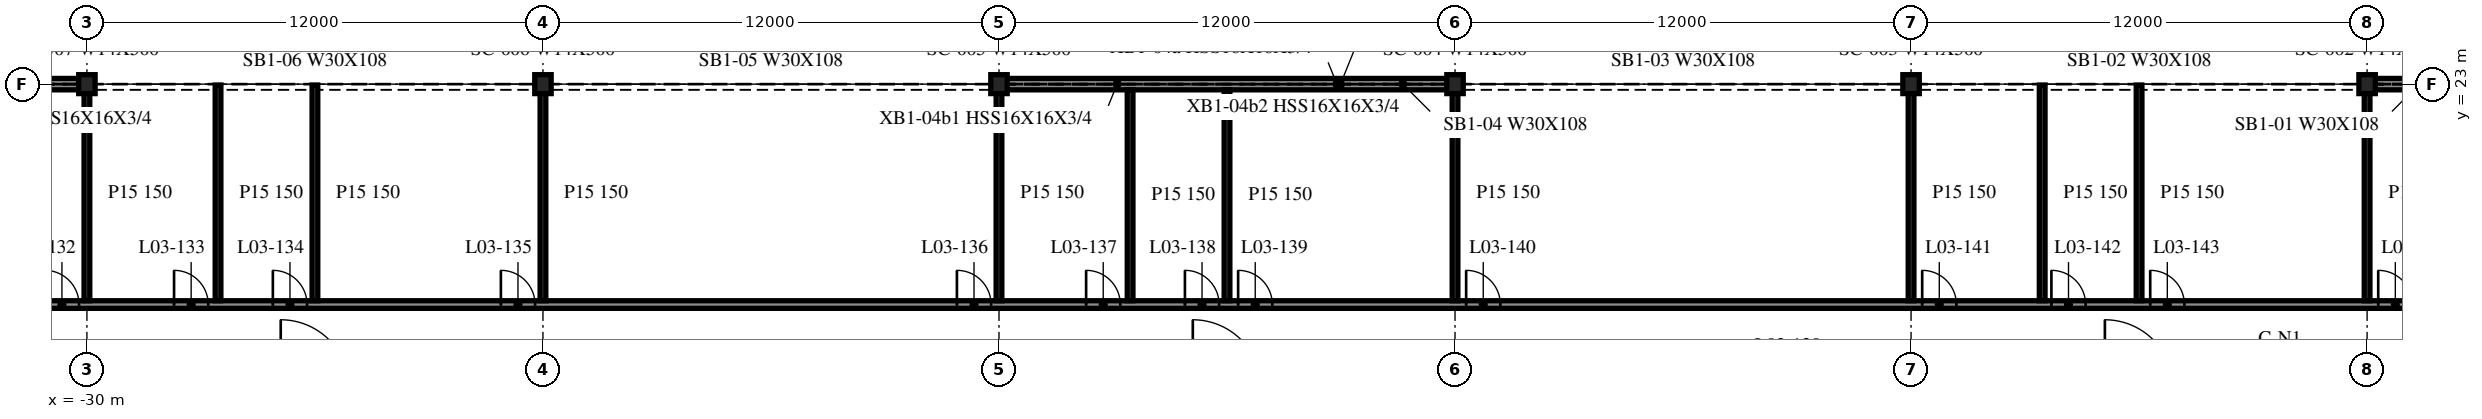
"""IFC4 building model, lengths in metres.
Left out: names, types, materials, properties, quantities, classifications, styles, units other than length and angle.
Written with IfcOpenShell. Run it as: python <this file> out.ifc"""

import sys

from ifc_helpers import new_model, si_unit, direction, frame, frame_2d, origin, origin_2d, place, context, subcontext, project, spatial, rectangle, i_section, extrude, element, fill, save


model = new_model("IFC4")
c1 = context("Model", 3, precision=1e-05, world=origin(), true_north=direction((0.0, 1.0)))
c2 = subcontext(c1, "Body", "Model", "MODEL_VIEW")
j1 = project(units=[si_unit("LENGTHUNIT", "METRE"), si_unit("PLANEANGLEUNIT", "RADIAN")], contexts=[c1])
p1 = place(None, origin())
s1 = spatial("IfcSite", under=j1, at=p1, CompositionType="ELEMENT")
p2 = place(p1, origin())
s2 = spatial("IfcBuilding", under=s1, at=p2, CompositionType="ELEMENT")
p3 = place(p2, frame((0.0, 0.0, 15.8)))
s3 = spatial("IfcBuildingStorey", under=s2, at=p3, CompositionType="ELEMENT", Elevation=15.8)
for number, where, z_axis, x_axis in (
    (1, (30.0, 23.0, -0.34), (0.0, 0.0, 1.0), (1.0, 0.0, 0.0)),
    (2, (18.0, 23.0, -0.34), (0.0, 0.0, 1.0), (1.0, 0.0, 0.0)),
    (3, (6.0, 23.0, -0.34), (0.0, 0.0, 1.0), (1.0, 0.0, 0.0)),
    (4, (-6.0, 23.0, -0.34), (0.0, 0.0, 1.0), (1.0, 0.0, 0.0)),
    (5, (-18.0, 23.0, -0.34), (0.0, 0.0, 1.0), (1.0, 0.0, 0.0)),
    (6, (-30.0, 23.0, -0.34), (0.0, 0.0, 1.0), (1.0, 0.0, 0.0)),
):
    element("IfcColumn", number, at=place(p3, frame(where, z_axis=z_axis, x_axis=x_axis)), inside=s3, PredefinedType="COLUMN", context=c2, shape_type="SweptSolid", body=[
        extrude(i_section(OverallWidth=0.432, OverallDepth=0.498, WebThickness=0.056, FlangeThickness=0.089, at=origin_2d()), origin(), (0.0, 0.0, 1.0), 4.3),
    ])
for number, where, z_axis, x_axis in (
    (7, (41.972, 23.0, 0.0), (0.0, 0.0, 1.0), (-1.0, 0.0, 0.0)),
    (8, (5.972, 23.0, 0.0), (0.0, 0.0, 1.0), (-1.0, 0.0, 0.0)),
    (9, (-30.028, 23.0, 0.0), (0.0, 0.0, 1.0), (-1.0, 0.0, 0.0)),
):
    element("IfcWall", number, at=place(p3, frame(where, z_axis=z_axis, x_axis=x_axis)), inside=s3, PredefinedType="NOTDEFINED", context=c2, shape_type="SweptSolid", body=[
        extrude(rectangle(XDim=11.944, YDim=0.3, at=frame_2d((5.972, 0.0))), origin(), (0.0, 0.0, 1.0), 3.203),
    ])
p4 = place(p3, frame((-47.807, 17.2, 0.0), z_axis=(0.0, 0.0, 1.0), x_axis=(1.0, 0.0, 0.0)))
e10 = element("IfcWall", 10, at=p4, inside=s3, PredefinedType="PARTITIONING", context=c2, shape_type="SweptSolid", body=[
    extrude(rectangle(XDim=95.615, YDim=0.2, at=frame_2d((47.807, 0.0))), origin(), (0.0, 0.0, 1.0), 3.96),
])
p5 = place(p4, frame((4.7, 0.0, 0.0)))
e11 = element("IfcOpeningElement", 11, at=p5, cuts=e10, PredefinedType="OPENING", context=c2, shape_type="SweptSolid", body=[
    extrude(rectangle(XDim=0.9, YDim=2.1, at=frame_2d((0.45, 1.05))), frame((0.0, 0.11, 0.0), z_axis=(0.0, -1.0, 0.0), x_axis=(1.0, 0.0, 0.0)), (0.0, 0.0, 1.0), 0.22),
])
p6 = place(p4, frame((16.7, 0.0, 0.0)))
e12 = element("IfcOpeningElement", 12, at=p6, cuts=e10, PredefinedType="OPENING", context=c2, shape_type="SweptSolid", body=[
    extrude(rectangle(XDim=0.9, YDim=2.1, at=frame_2d((0.45, 1.05))), frame((0.0, 0.11, 0.0), z_axis=(0.0, -1.0, 0.0), x_axis=(1.0, 0.0, 0.0)), (0.0, 0.0, 1.0), 0.22),
])
p7 = place(p4, frame((20.1, 0.0, 0.0)))
e13 = element("IfcOpeningElement", 13, at=p7, cuts=e10, PredefinedType="OPENING", context=c2, shape_type="SweptSolid", body=[
    extrude(rectangle(XDim=0.9, YDim=2.1, at=frame_2d((0.45, 1.05))), frame((0.0, 0.11, 0.0), z_axis=(0.0, -1.0, 0.0), x_axis=(1.0, 0.0, 0.0)), (0.0, 0.0, 1.0), 0.22),
])
p8 = place(p4, frame((22.7, 0.0, 0.0)))
e14 = element("IfcOpeningElement", 14, at=p8, cuts=e10, PredefinedType="OPENING", context=c2, shape_type="SweptSolid", body=[
    extrude(rectangle(XDim=0.9, YDim=2.1, at=frame_2d((0.45, 1.05))), frame((0.0, 0.11, 0.0), z_axis=(0.0, -1.0, 0.0), x_axis=(1.0, 0.0, 0.0)), (0.0, 0.0, 1.0), 0.22),
])
p9 = place(p4, frame((28.7, 0.0, 0.0)))
e15 = element("IfcOpeningElement", 15, at=p9, cuts=e10, PredefinedType="OPENING", context=c2, shape_type="SweptSolid", body=[
    extrude(rectangle(XDim=0.9, YDim=2.1, at=frame_2d((0.45, 1.05))), frame((0.0, 0.11, 0.0), z_axis=(0.0, -1.0, 0.0), x_axis=(1.0, 0.0, 0.0)), (0.0, 0.0, 1.0), 0.22),
])
p10 = place(p4, frame((40.7, 0.0, 0.0)))
e16 = element("IfcOpeningElement", 16, at=p10, cuts=e10, PredefinedType="OPENING", context=c2, shape_type="SweptSolid", body=[
    extrude(rectangle(XDim=0.9, YDim=2.1, at=frame_2d((0.45, 1.05))), frame((0.0, 0.11, 0.0), z_axis=(0.0, -1.0, 0.0), x_axis=(1.0, 0.0, 0.0)), (0.0, 0.0, 1.0), 0.22),
])
p11 = place(p4, frame((44.1, 0.0, 0.0)))
e17 = element("IfcOpeningElement", 17, at=p11, cuts=e10, PredefinedType="OPENING", context=c2, shape_type="SweptSolid", body=[
    extrude(rectangle(XDim=0.9, YDim=2.1, at=frame_2d((0.45, 1.05))), frame((0.0, 0.11, 0.0), z_axis=(0.0, -1.0, 0.0), x_axis=(1.0, 0.0, 0.0)), (0.0, 0.0, 1.0), 0.22),
])
p12 = place(p4, frame((46.7, 0.0, 0.0)))
e18 = element("IfcOpeningElement", 18, at=p12, cuts=e10, PredefinedType="OPENING", context=c2, shape_type="SweptSolid", body=[
    extrude(rectangle(XDim=0.9, YDim=2.1, at=frame_2d((0.45, 1.05))), frame((0.0, 0.11, 0.0), z_axis=(0.0, -1.0, 0.0), x_axis=(1.0, 0.0, 0.0)), (0.0, 0.0, 1.0), 0.22),
])
p13 = place(p4, frame((48.1, 0.0, 0.0)))
e19 = element("IfcOpeningElement", 19, at=p13, cuts=e10, PredefinedType="OPENING", context=c2, shape_type="SweptSolid", body=[
    extrude(rectangle(XDim=0.9, YDim=2.1, at=frame_2d((0.45, 1.05))), frame((0.0, 0.11, 0.0), z_axis=(0.0, -1.0, 0.0), x_axis=(1.0, 0.0, 0.0)), (0.0, 0.0, 1.0), 0.22),
])
p14 = place(p4, frame((54.1, 0.0, 0.0)))
e20 = element("IfcOpeningElement", 20, at=p14, cuts=e10, PredefinedType="OPENING", context=c2, shape_type="SweptSolid", body=[
    extrude(rectangle(XDim=0.9, YDim=2.1, at=frame_2d((0.45, 1.05))), frame((0.0, 0.11, 0.0), z_axis=(0.0, -1.0, 0.0), x_axis=(1.0, 0.0, 0.0)), (0.0, 0.0, 1.0), 0.22),
])
p15 = place(p4, frame((66.1, 0.0, 0.0)))
e21 = element("IfcOpeningElement", 21, at=p15, cuts=e10, PredefinedType="OPENING", context=c2, shape_type="SweptSolid", body=[
    extrude(rectangle(XDim=0.9, YDim=2.1, at=frame_2d((0.45, 1.05))), frame((0.0, 0.11, 0.0), z_axis=(0.0, -1.0, 0.0), x_axis=(1.0, 0.0, 0.0)), (0.0, 0.0, 1.0), 0.22),
])
p16 = place(p4, frame((69.5, 0.0, 0.0)))
e22 = element("IfcOpeningElement", 22, at=p16, cuts=e10, PredefinedType="OPENING", context=c2, shape_type="SweptSolid", body=[
    extrude(rectangle(XDim=0.9, YDim=2.1, at=frame_2d((0.45, 1.05))), frame((0.0, 0.11, 0.0), z_axis=(0.0, -1.0, 0.0), x_axis=(1.0, 0.0, 0.0)), (0.0, 0.0, 1.0), 0.22),
])
p17 = place(p4, frame((72.1, 0.0, 0.0)))
e23 = element("IfcOpeningElement", 23, at=p17, cuts=e10, PredefinedType="OPENING", context=c2, shape_type="SweptSolid", body=[
    extrude(rectangle(XDim=0.9, YDim=2.1, at=frame_2d((0.45, 1.05))), frame((0.0, 0.11, 0.0), z_axis=(0.0, -1.0, 0.0), x_axis=(1.0, 0.0, 0.0)), (0.0, 0.0, 1.0), 0.22),
])
p18 = place(p4, frame((78.1, 0.0, 0.0)))
e24 = element("IfcOpeningElement", 24, at=p18, cuts=e10, PredefinedType="OPENING", context=c2, shape_type="SweptSolid", body=[
    extrude(rectangle(XDim=0.9, YDim=2.1, at=frame_2d((0.45, 1.05))), frame((0.0, 0.11, 0.0), z_axis=(0.0, -1.0, 0.0), x_axis=(1.0, 0.0, 0.0)), (0.0, 0.0, 1.0), 0.22),
])
p19 = place(p4, frame((90.1, 0.0, 0.0)))
e25 = element("IfcOpeningElement", 25, at=p19, cuts=e10, PredefinedType="OPENING", context=c2, shape_type="SweptSolid", body=[
    extrude(rectangle(XDim=0.9, YDim=2.1, at=frame_2d((0.45, 1.05))), frame((0.0, 0.11, 0.0), z_axis=(0.0, -1.0, 0.0), x_axis=(1.0, 0.0, 0.0)), (0.0, 0.0, 1.0), 0.22),
])
for number, where, z_axis, x_axis in (
    (26, (-30.0, 17.3, 0.0), (0.0, 0.0, 1.0), (0.0, 1.0, 0.0)),
    (27, (-26.55, 17.3, 0.0), (0.0, 0.0, 1.0), (0.0, 1.0, 0.0)),
    (28, (-24.0, 17.3, 0.0), (0.0, 0.0, 1.0), (0.0, 1.0, 0.0)),
    (29, (-18.0, 17.3, 0.0), (0.0, 0.0, 1.0), (0.0, 1.0, 0.0)),
    (30, (-6.0, 17.3, 0.0), (0.0, 0.0, 1.0), (0.0, 1.0, 0.0)),
):
    element("IfcWall", number, at=place(p3, frame(where, z_axis=z_axis, x_axis=x_axis)), inside=s3, PredefinedType="PARTITIONING", context=c2, shape_type="SweptSolid", body=[
        extrude(rectangle(XDim=5.675, YDim=0.15, at=frame_2d((2.837, 0.0))), origin(), (0.0, 0.0, 1.0), 3.96),
    ])
for number, where, z_axis, x_axis in (
    (31, (-2.55, 17.3, 0.0), (0.0, 0.0, 1.0), (0.0, 1.0, 0.0)),
    (32, (0.0, 17.3, 0.0), (0.0, 0.0, 1.0), (0.0, 1.0, 0.0)),
):
    element("IfcWall", number, at=place(p3, frame(where, z_axis=z_axis, x_axis=x_axis)), inside=s3, PredefinedType="PARTITIONING", context=c2, shape_type="SweptSolid", body=[
        extrude(rectangle(XDim=5.55, YDim=0.15, at=frame_2d((2.775, 0.0))), origin(), (0.0, 0.0, 1.0), 3.96),
    ])
for number, where, z_axis, x_axis in (
    (33, (6.0, 17.3, 0.0), (0.0, 0.0, 1.0), (0.0, 1.0, 0.0)),
    (34, (18.0, 17.3, 0.0), (0.0, 0.0, 1.0), (0.0, 1.0, 0.0)),
    (35, (21.45, 17.3, 0.0), (0.0, 0.0, 1.0), (0.0, 1.0, 0.0)),
    (36, (24.0, 17.3, 0.0), (0.0, 0.0, 1.0), (0.0, 1.0, 0.0)),
    (37, (30.0, 17.3, 0.0), (0.0, 0.0, 1.0), (0.0, 1.0, 0.0)),
):
    element("IfcWall", number, at=place(p3, frame(where, z_axis=z_axis, x_axis=x_axis)), inside=s3, PredefinedType="PARTITIONING", context=c2, shape_type="SweptSolid", body=[
        extrude(rectangle(XDim=5.675, YDim=0.15, at=frame_2d((2.837, 0.0))), origin(), (0.0, 0.0, 1.0), 3.96),
    ])
p20 = place(p6, origin())
e38 = element("IfcDoor", 38, at=p20, inside=s3, OperationType="SINGLE_SWING_LEFT", PredefinedType="DOOR", context=c2, shape_type="SweptSolid", body=[
    extrude(rectangle(XDim=0.9, YDim=2.1, at=frame_2d((0.45, 1.05))), frame((0.0, 0.025, 0.0), z_axis=(0.0, -1.0, 0.0), x_axis=(1.0, 0.0, 0.0)), (0.0, 0.0, 1.0), 0.05),
])
fill(e12, e38)
p21 = place(p7, origin())
e39 = element("IfcDoor", 39, at=p21, inside=s3, OperationType="SINGLE_SWING_LEFT", PredefinedType="DOOR", context=c2, shape_type="SweptSolid", body=[
    extrude(rectangle(XDim=0.9, YDim=2.1, at=frame_2d((0.45, 1.05))), frame((0.0, 0.025, 0.0), z_axis=(0.0, -1.0, 0.0), x_axis=(1.0, 0.0, 0.0)), (0.0, 0.0, 1.0), 0.05),
])
fill(e13, e39)
p22 = place(p8, origin())
e40 = element("IfcDoor", 40, at=p22, inside=s3, OperationType="SINGLE_SWING_LEFT", PredefinedType="DOOR", context=c2, shape_type="SweptSolid", body=[
    extrude(rectangle(XDim=0.9, YDim=2.1, at=frame_2d((0.45, 1.05))), frame((0.0, 0.025, 0.0), z_axis=(0.0, -1.0, 0.0), x_axis=(1.0, 0.0, 0.0)), (0.0, 0.0, 1.0), 0.05),
])
fill(e14, e40)
p23 = place(p9, origin())
e41 = element("IfcDoor", 41, at=p23, inside=s3, OperationType="SINGLE_SWING_LEFT", PredefinedType="DOOR", context=c2, shape_type="SweptSolid", body=[
    extrude(rectangle(XDim=0.9, YDim=2.1, at=frame_2d((0.45, 1.05))), frame((0.0, 0.025, 0.0), z_axis=(0.0, -1.0, 0.0), x_axis=(1.0, 0.0, 0.0)), (0.0, 0.0, 1.0), 0.05),
])
fill(e15, e41)
p24 = place(p10, origin())
e42 = element("IfcDoor", 42, at=p24, inside=s3, OperationType="SINGLE_SWING_LEFT", PredefinedType="DOOR", context=c2, shape_type="SweptSolid", body=[
    extrude(rectangle(XDim=0.9, YDim=2.1, at=frame_2d((0.45, 1.05))), frame((0.0, 0.025, 0.0), z_axis=(0.0, -1.0, 0.0), x_axis=(1.0, 0.0, 0.0)), (0.0, 0.0, 1.0), 0.05),
])
fill(e16, e42)
p25 = place(p11, origin())
e43 = element("IfcDoor", 43, at=p25, inside=s3, OperationType="SINGLE_SWING_LEFT", PredefinedType="DOOR", context=c2, shape_type="SweptSolid", body=[
    extrude(rectangle(XDim=0.9, YDim=2.1, at=frame_2d((0.45, 1.05))), frame((0.0, 0.025, 0.0), z_axis=(0.0, -1.0, 0.0), x_axis=(1.0, 0.0, 0.0)), (0.0, 0.0, 1.0), 0.05),
])
fill(e17, e43)
p26 = place(p12, origin())
e44 = element("IfcDoor", 44, at=p26, inside=s3, OperationType="SINGLE_SWING_LEFT", PredefinedType="DOOR", context=c2, shape_type="SweptSolid", body=[
    extrude(rectangle(XDim=0.9, YDim=2.1, at=frame_2d((0.45, 1.05))), frame((0.0, 0.025, 0.0), z_axis=(0.0, -1.0, 0.0), x_axis=(1.0, 0.0, 0.0)), (0.0, 0.0, 1.0), 0.05),
])
fill(e18, e44)
p27 = place(p13, origin())
e45 = element("IfcDoor", 45, at=p27, inside=s3, OperationType="SINGLE_SWING_RIGHT", PredefinedType="DOOR", context=c2, shape_type="SweptSolid", body=[
    extrude(rectangle(XDim=0.9, YDim=2.1, at=frame_2d((0.45, 1.05))), frame((0.0, 0.025, 0.0), z_axis=(0.0, -1.0, 0.0), x_axis=(1.0, 0.0, 0.0)), (0.0, 0.0, 1.0), 0.05),
])
fill(e19, e45)
p28 = place(p14, origin())
e46 = element("IfcDoor", 46, at=p28, inside=s3, OperationType="SINGLE_SWING_RIGHT", PredefinedType="DOOR", context=c2, shape_type="SweptSolid", body=[
    extrude(rectangle(XDim=0.9, YDim=2.1, at=frame_2d((0.45, 1.05))), frame((0.0, 0.025, 0.0), z_axis=(0.0, -1.0, 0.0), x_axis=(1.0, 0.0, 0.0)), (0.0, 0.0, 1.0), 0.05),
])
fill(e20, e46)
p29 = place(p15, origin())
e47 = element("IfcDoor", 47, at=p29, inside=s3, OperationType="SINGLE_SWING_RIGHT", PredefinedType="DOOR", context=c2, shape_type="SweptSolid", body=[
    extrude(rectangle(XDim=0.9, YDim=2.1, at=frame_2d((0.45, 1.05))), frame((0.0, 0.025, 0.0), z_axis=(0.0, -1.0, 0.0), x_axis=(1.0, 0.0, 0.0)), (0.0, 0.0, 1.0), 0.05),
])
fill(e21, e47)
p30 = place(p16, origin())
e48 = element("IfcDoor", 48, at=p30, inside=s3, OperationType="SINGLE_SWING_RIGHT", PredefinedType="DOOR", context=c2, shape_type="SweptSolid", body=[
    extrude(rectangle(XDim=0.9, YDim=2.1, at=frame_2d((0.45, 1.05))), frame((0.0, 0.025, 0.0), z_axis=(0.0, -1.0, 0.0), x_axis=(1.0, 0.0, 0.0)), (0.0, 0.0, 1.0), 0.05),
])
fill(e22, e48)
p31 = place(p17, origin())
e49 = element("IfcDoor", 49, at=p31, inside=s3, OperationType="SINGLE_SWING_RIGHT", PredefinedType="DOOR", context=c2, shape_type="SweptSolid", body=[
    extrude(rectangle(XDim=0.9, YDim=2.1, at=frame_2d((0.45, 1.05))), frame((0.0, 0.025, 0.0), z_axis=(0.0, -1.0, 0.0), x_axis=(1.0, 0.0, 0.0)), (0.0, 0.0, 1.0), 0.05),
])
fill(e23, e49)
p32 = place(p18, origin())
e50 = element("IfcDoor", 50, at=p32, inside=s3, OperationType="SINGLE_SWING_RIGHT", PredefinedType="DOOR", context=c2, shape_type="SweptSolid", body=[
    extrude(rectangle(XDim=0.9, YDim=2.1, at=frame_2d((0.45, 1.05))), frame((0.0, 0.025, 0.0), z_axis=(0.0, -1.0, 0.0), x_axis=(1.0, 0.0, 0.0)), (0.0, 0.0, 1.0), 0.05),
])
fill(e24, e50)
save(model, sys.argv[1])
